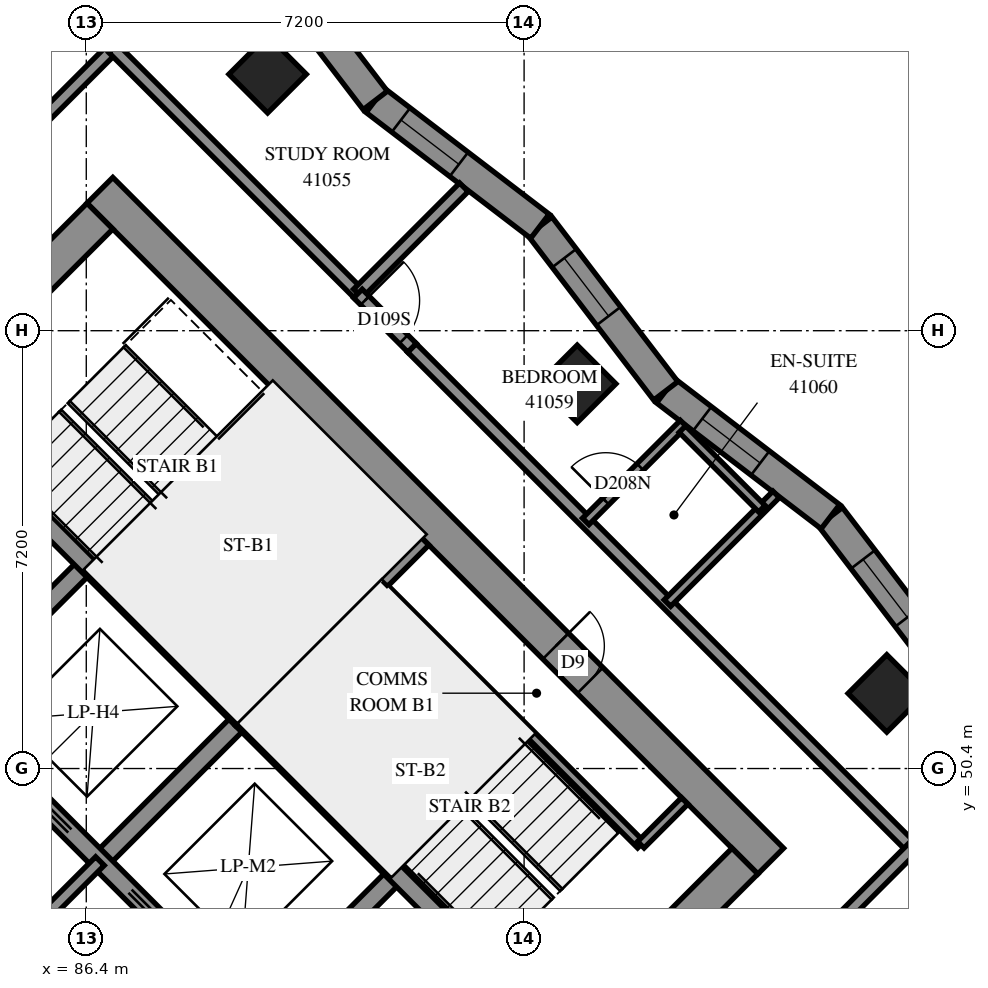
"""IFC4 building model, lengths in metres.
Left out: names, types, materials, properties, quantities, classifications, styles, units other than length and angle.
Written with IfcOpenShell. Run it as: python <this file> out.ifc"""

import sys

from ifc_helpers import new_model, si_unit, direction, frame, frame_2d, origin, origin_2d, place, context, subcontext, project, spatial, polyline, rectangle, outline, extrude, element, fill, save


model = new_model("IFC4")
c1 = context("Model", 3, precision=1e-05, world=origin(), true_north=direction((0.0, 1.0)))
c2 = subcontext(c1, "Body", "Model", "MODEL_VIEW")
j1 = project(units=[si_unit("LENGTHUNIT", "METRE"), si_unit("PLANEANGLEUNIT", "RADIAN")], contexts=[c1])
p1 = place(None, origin())
s1 = spatial("IfcSite", under=j1, at=p1, CompositionType="ELEMENT")
p2 = place(p1, origin())
s2 = spatial("IfcBuilding", under=s1, at=p2, CompositionType="ELEMENT")
p3 = place(p2, frame((0.0, 0.0, 152.4)))
s3 = spatial("IfcBuildingStorey", under=s2, at=p3, CompositionType="ELEMENT", Elevation=152.4)
for number, where, z_axis, x_axis in (
    (1, (89.382, 61.818, 0.0), (0.0, 0.0, 1.0), (0.707, -0.707, 0.0)),
    (2, (94.474, 56.727, 0.0), (0.0, 0.0, 1.0), (0.707, -0.707, 0.0)),
    (3, (99.565, 51.635, 0.0), (0.0, 0.0, 1.0), (0.707, -0.707, 0.0)),
):
    element("IfcColumn", number, at=place(p3, frame(where, z_axis=z_axis, x_axis=x_axis)), inside=s3, PredefinedType="COLUMN", context=c2, shape_type="SweptSolid", body=[
        extrude(rectangle(XDim=0.9, YDim=0.9, at=origin_2d()), origin(), (0.0, 0.0, 1.0), 3.1),
    ])
p4 = place(p3, frame((76.018, 49.302, -0.3), z_axis=(0.0, 0.0, 1.0), x_axis=(0.7071067812, -0.7071067812, 0.0)))
e4 = element("IfcWall", 4, at=p4, inside=s3, PredefinedType="SHEAR", context=c2, shape_type="SweptSolid", body=[
    extrude(rectangle(XDim=15.6, YDim=0.6, at=frame_2d((7.8, 0.0))), origin(), (0.0, 0.0, 1.0), 2.7),
])
p5 = place(p3, frame((86.625, 59.908, -0.3), z_axis=(0.0, 0.0, 1.0), x_axis=(0.7071067812, -0.7071067812, 0.0)))
e5 = element("IfcWall", 5, at=p5, inside=s3, PredefinedType="SHEAR", context=c2, shape_type="SweptSolid", body=[
    extrude(rectangle(XDim=15.6, YDim=0.6, at=frame_2d((7.8, 0.0))), origin(), (0.0, 0.0, 1.0), 2.7),
])
p6 = place(p5, frame((10.6, 0.0, 0.3)))
e6 = element("IfcOpeningElement", 6, at=p6, cuts=e5, PredefinedType="OPENING", context=c2, shape_type="SweptSolid", body=[
    extrude(rectangle(XDim=0.8, YDim=2.1, at=frame_2d((0.4, 1.05))), frame((0.0, 0.31, 0.0), z_axis=(0.0, -1.0, 0.0), x_axis=(1.0, 0.0, 0.0)), (0.0, 0.0, 1.0), 0.62),
])
p7 = place(p3, frame((76.442, 49.302, -0.3), z_axis=(0.0, 0.0, 1.0), x_axis=(0.7071067812, 0.7071067812, 0.0)))
e7 = element("IfcWall", 7, at=p7, inside=s3, PredefinedType="SHEAR", context=c2, shape_type="SweptSolid", body=[
    extrude(rectangle(XDim=14.4, YDim=0.6, at=frame_2d((7.2, 0.0))), origin(), (0.0, 0.0, 1.0), 2.7),
])
p8 = place(p7, frame((4.55, 0.0, 0.3)))
e8 = element("IfcOpeningElement", 8, at=p8, cuts=e7, PredefinedType="OPENING", context=c2, shape_type="SweptSolid", body=[
    extrude(rectangle(XDim=1.1, YDim=2.1, at=frame_2d((0.55, 1.05))), frame((0.0, 0.31, 0.0), z_axis=(0.0, -1.0, 0.0), x_axis=(1.0, 0.0, 0.0)), (0.0, 0.0, 1.0), 0.62),
])
p9 = place(p7, frame((11.35, 0.0, 0.3)))
e9 = element("IfcOpeningElement", 9, at=p9, cuts=e7, PredefinedType="OPENING", context=c2, shape_type="SweptSolid", body=[
    extrude(rectangle(XDim=1.1, YDim=2.1, at=frame_2d((0.55, 1.05))), frame((0.0, 0.31, 0.0), z_axis=(0.0, -1.0, 0.0), x_axis=(1.0, 0.0, 0.0)), (0.0, 0.0, 1.0), 0.62),
])
p10 = place(p3, frame((87.049, 38.695, -0.3), z_axis=(0.0, 0.0, 1.0), x_axis=(0.7071067812, 0.7071067812, 0.0)))
e10 = element("IfcWall", 10, at=p10, inside=s3, PredefinedType="SHEAR", context=c2, shape_type="SweptSolid", body=[
    extrude(rectangle(XDim=14.4, YDim=0.6, at=frame_2d((7.2, 0.0))), origin(), (0.0, 0.0, 1.0), 2.7),
])
p11 = place(p10, frame((4.55, 0.0, 0.3)))
e11 = element("IfcOpeningElement", 11, at=p11, cuts=e10, PredefinedType="OPENING", context=c2, shape_type="SweptSolid", body=[
    extrude(rectangle(XDim=1.1, YDim=2.1, at=frame_2d((0.55, 1.05))), frame((0.0, 0.31, 0.0), z_axis=(0.0, -1.0, 0.0), x_axis=(1.0, 0.0, 0.0)), (0.0, 0.0, 1.0), 0.62),
])
p12 = place(p10, frame((11.35, 0.0, 0.3)))
e12 = element("IfcOpeningElement", 12, at=p12, cuts=e10, PredefinedType="OPENING", context=c2, shape_type="SweptSolid", body=[
    extrude(rectangle(XDim=1.1, YDim=2.1, at=frame_2d((0.55, 1.05))), frame((0.0, 0.31, 0.0), z_axis=(0.0, -1.0, 0.0), x_axis=(1.0, 0.0, 0.0)), (0.0, 0.0, 1.0), 0.62),
])
p13 = place(p3, frame((84.079, 51.423, 0.0), z_axis=(0.0, 0.0, 1.0), x_axis=(0.7071219326, 0.7070916295, 0.0)))
e13 = element("IfcWall", 13, at=p13, inside=s3, PredefinedType="SOLIDWALL", context=c2, shape_type="SweptSolid", body=[
    extrude(rectangle(XDim=3.3, YDim=0.3, at=frame_2d((1.65, 0.0))), origin(), (0.0, 0.0, 1.0), 3.1),
])
for number, where, z_axis, x_axis in (
    (14, (86.625, 48.878, 0.0), (0.0, 0.0, 1.0), (0.707, 0.707, 0.0)),
    (15, (89.17, 46.332, 0.0), (0.0, 0.0, 1.0), (0.707, 0.707, 0.0)),
):
    element("IfcWall", number, at=place(p3, frame(where, z_axis=z_axis, x_axis=x_axis)), inside=s3, PredefinedType="SOLIDWALL", context=c2, shape_type="SweptSolid", body=[
        extrude(rectangle(XDim=3.3, YDim=0.3, at=frame_2d((1.65, 0.0))), origin(), (0.0, 0.0, 1.0), 3.1),
    ])
p14 = place(p3, frame((78.988, 51.423, 0.0), z_axis=(0.0, 0.0, 1.0), x_axis=(0.7071067812, -0.7071067812, 0.0)))
e16 = element("IfcWall", 16, at=p14, inside=s3, PredefinedType="SOLIDWALL", context=c2, shape_type="SweptSolid", body=[
    extrude(rectangle(XDim=14.4, YDim=0.3, at=frame_2d((7.2, 0.0))), origin(), (0.0, 0.0, 1.0), 3.1),
])
p15 = place(p14, frame((1.35, 0.0, 0.0)))
e17 = element("IfcOpeningElement", 17, at=p15, cuts=e16, PredefinedType="OPENING", context=c2, shape_type="SweptSolid", body=[
    extrude(rectangle(XDim=0.9, YDim=2.1, at=frame_2d((0.45, 1.05))), frame((0.0, 0.16, 0.0), z_axis=(0.0, -1.0, 0.0), x_axis=(1.0, 0.0, 0.0)), (0.0, 0.0, 1.0), 0.32),
])
p16 = place(p14, frame((4.95, 0.0, 0.0)))
e18 = element("IfcOpeningElement", 18, at=p16, cuts=e16, PredefinedType="OPENING", context=c2, shape_type="SweptSolid", body=[
    extrude(rectangle(XDim=0.9, YDim=2.1, at=frame_2d((0.45, 1.05))), frame((0.0, 0.16, 0.0), z_axis=(0.0, -1.0, 0.0), x_axis=(1.0, 0.0, 0.0)), (0.0, 0.0, 1.0), 0.32),
])
p17 = place(p14, frame((8.55, 0.0, 0.0)))
e19 = element("IfcOpeningElement", 19, at=p17, cuts=e16, PredefinedType="OPENING", context=c2, shape_type="SweptSolid", body=[
    extrude(rectangle(XDim=0.9, YDim=2.1, at=frame_2d((0.45, 1.05))), frame((0.0, 0.16, 0.0), z_axis=(0.0, -1.0, 0.0), x_axis=(1.0, 0.0, 0.0)), (0.0, 0.0, 1.0), 0.32),
])
p18 = place(p14, frame((12.05, 0.0, 0.0)))
e20 = element("IfcOpeningElement", 20, at=p18, cuts=e16, PredefinedType="OPENING", context=c2, shape_type="SweptSolid", body=[
    extrude(rectangle(XDim=1.1, YDim=2.1, at=frame_2d((0.55, 1.05))), frame((0.0, 0.16, 0.0), z_axis=(0.0, -1.0, 0.0), x_axis=(1.0, 0.0, 0.0)), (0.0, 0.0, 1.0), 0.32),
])
p19 = place(p3, frame((81.534, 53.969, 0.0), z_axis=(0.0, 0.0, 1.0), x_axis=(0.707103309, -0.7071102534, 0.0)))
e21 = element("IfcWall", 21, at=p19, inside=s3, PredefinedType="SOLIDWALL", context=c2, shape_type="SweptSolid", body=[
    extrude(rectangle(XDim=14.4, YDim=0.3, at=frame_2d((7.2, 0.0))), origin(), (0.0, 0.0, 1.0), 3.1),
])
p20 = place(p19, frame((1.25, 0.0, 0.0)))
e22 = element("IfcOpeningElement", 22, at=p20, cuts=e21, PredefinedType="OPENING", context=c2, shape_type="SweptSolid", body=[
    extrude(rectangle(XDim=1.1, YDim=2.1, at=frame_2d((0.55, 1.05))), frame((0.0, 0.16, 0.0), z_axis=(0.0, -1.0, 0.0), x_axis=(1.0, 0.0, 0.0)), (0.0, 0.0, 1.0), 0.32),
])
p21 = place(p19, frame((4.85, 0.0, 0.0)))
e23 = element("IfcOpeningElement", 23, at=p21, cuts=e21, PredefinedType="OPENING", context=c2, shape_type="SweptSolid", body=[
    extrude(rectangle(XDim=1.1, YDim=2.1, at=frame_2d((0.55, 1.05))), frame((0.0, 0.16, 0.0), z_axis=(0.0, -1.0, 0.0), x_axis=(1.0, 0.0, 0.0)), (0.0, 0.0, 1.0), 0.32),
])
p22 = place(p19, frame((8.45, 0.0, 0.0)))
e24 = element("IfcOpeningElement", 24, at=p22, cuts=e21, PredefinedType="OPENING", context=c2, shape_type="SweptSolid", body=[
    extrude(rectangle(XDim=1.1, YDim=2.1, at=frame_2d((0.55, 1.05))), frame((0.0, 0.16, 0.0), z_axis=(0.0, -1.0, 0.0), x_axis=(1.0, 0.0, 0.0)), (0.0, 0.0, 1.0), 0.32),
])
p23 = place(p19, frame((12.05, 0.0, 0.0)))
e25 = element("IfcOpeningElement", 25, at=p23, cuts=e21, PredefinedType="OPENING", context=c2, shape_type="SweptSolid", body=[
    extrude(rectangle(XDim=1.1, YDim=2.1, at=frame_2d((0.55, 1.05))), frame((0.0, 0.16, 0.0), z_axis=(0.0, -1.0, 0.0), x_axis=(1.0, 0.0, 0.0)), (0.0, 0.0, 1.0), 0.32),
])
for number, where, z_axis, x_axis in (
    (26, (83.867, 56.302, 0.0), (0.0, 0.0, 1.0), (0.707, -0.707, 0.0)),
    (27, (88.958, 51.211, 0.0), (0.0, 0.0, 1.0), (0.707, -0.707, 0.0)),
):
    element("IfcWall", number, at=place(p3, frame(where, z_axis=z_axis, x_axis=x_axis)), inside=s3, PredefinedType="SOLIDWALL", context=c2, shape_type="SweptSolid", body=[
        extrude(rectangle(XDim=7.2, YDim=0.3, at=frame_2d((3.6, 0.0))), origin(), (0.0, 0.0, 1.0), 3.1),
    ])
p24 = place(p3, frame((88.958, 51.211, 0.0), z_axis=(0.0, 0.0, 1.0), x_axis=(0.7071067812, 0.7071067812, 0.0)))
e28 = element("IfcWall", 28, at=p24, inside=s3, PredefinedType="SOLIDWALL", context=c2, shape_type="SweptSolid", body=[
    extrude(rectangle(XDim=4.2, YDim=0.3, at=frame_2d((2.1, 0.0))), origin(), (0.0, 0.0, 1.0), 3.1),
])
p25 = place(p3, frame((100.707, 51.834, 0.0), z_axis=(0.0, 0.0, 1.0), x_axis=(-0.6073041389, 0.7944694348, 0.0)))
e29 = element("IfcWall", 29, at=p25, inside=s3, PredefinedType="SOLIDWALL", context=c2, shape_type="SweptSolid", body=[
    extrude(outline(polyline([(0.033, -0.25), (3.441, -0.25), (3.374, 0.25), (-0.033, 0.25), (0.033, -0.25)])), origin(), (0.0, 0.0, 1.0), 3.1),
])
p26 = place(p25, frame((1.324, 0.0, 0.45)))
e30 = element("IfcOpeningElement", 30, at=p26, cuts=e29, PredefinedType="OPENING", context=c2, shape_type="SweptSolid", body=[
    extrude(rectangle(XDim=1.2, YDim=2.5, at=frame_2d((0.6, 1.25))), frame((0.0, 0.26, 0.0), z_axis=(0.0, -1.0, 0.0), x_axis=(1.0, 0.0, 0.0)), (0.0, 0.0, 1.0), 0.52),
])
p27 = place(p3, frame((98.637, 54.541, 0.0), z_axis=(0.0, 0.0, 1.0), x_axis=(-0.7944694348, 0.6073041389, 0.0)))
e31 = element("IfcWall", 31, at=p27, inside=s3, PredefinedType="SOLIDWALL", context=c2, shape_type="SweptSolid", body=[
    extrude(outline(polyline([(-0.033, -0.25), (3.374, -0.25), (3.441, 0.25), (0.033, 0.25), (-0.033, -0.25)])), origin(), (0.0, 0.0, 1.0), 3.1),
])
p28 = place(p27, frame((1.452, 0.0, 0.45)))
e32 = element("IfcOpeningElement", 32, at=p28, cuts=e31, PredefinedType="OPENING", context=c2, shape_type="SweptSolid", body=[
    extrude(rectangle(XDim=1.2, YDim=2.5, at=frame_2d((0.6, 1.25))), frame((0.0, 0.26, 0.0), z_axis=(0.0, -1.0, 0.0), x_axis=(1.0, 0.0, 0.0)), (0.0, 0.0, 1.0), 0.52),
])
p29 = place(p3, frame((95.93, 56.611, 0.0), z_axis=(0.0, 0.0, 1.0), x_axis=(-0.6073041389, 0.7944694348, 0.0)))
e33 = element("IfcWall", 33, at=p29, inside=s3, PredefinedType="SOLIDWALL", context=c2, shape_type="SweptSolid", body=[
    extrude(outline(polyline([(0.033, -0.25), (3.441, -0.25), (3.374, 0.25), (-0.033, 0.25), (0.033, -0.25)])), origin(), (0.0, 0.0, 1.0), 3.1),
])
p30 = place(p29, frame((1.548, 0.0, 0.45)))
e34 = element("IfcOpeningElement", 34, at=p30, cuts=e33, PredefinedType="OPENING", context=c2, shape_type="SweptSolid", body=[
    extrude(rectangle(XDim=1.2, YDim=2.5, at=frame_2d((0.6, 1.25))), frame((0.0, 0.26, 0.0), z_axis=(0.0, -1.0, 0.0), x_axis=(1.0, 0.0, 0.0)), (0.0, 0.0, 1.0), 0.52),
])
p31 = place(p3, frame((93.86, 59.318, 0.0), z_axis=(0.0, 0.0, 1.0), x_axis=(-0.7944694348, 0.6073041389, 0.0)))
e35 = element("IfcWall", 35, at=p31, inside=s3, PredefinedType="SOLIDWALL", context=c2, shape_type="SweptSolid", body=[
    extrude(outline(polyline([(-0.033, -0.25), (3.374, -0.25), (3.441, 0.25), (0.033, 0.25), (-0.033, -0.25)])), origin(), (0.0, 0.0, 1.0), 3.1),
])
p32 = place(p31, frame((1.677, 0.0, 0.45)))
e36 = element("IfcOpeningElement", 36, at=p32, cuts=e35, PredefinedType="OPENING", context=c2, shape_type="SweptSolid", body=[
    extrude(rectangle(XDim=1.2, YDim=2.5, at=frame_2d((0.6, 1.25))), frame((0.0, 0.26, 0.0), z_axis=(0.0, -1.0, 0.0), x_axis=(1.0, 0.0, 0.0)), (0.0, 0.0, 1.0), 0.52),
])
p33 = place(p3, frame((91.153, 61.388, 0.0), z_axis=(0.0, 0.0, 1.0), x_axis=(-0.6073041389, 0.7944694348, 0.0)))
e37 = element("IfcWall", 37, at=p33, inside=s3, PredefinedType="SOLIDWALL", context=c2, shape_type="SweptSolid", body=[
    extrude(outline(polyline([(0.033, -0.25), (3.441, -0.25), (3.374, 0.25), (-0.033, 0.25), (0.033, -0.25)])), origin(), (0.0, 0.0, 1.0), 3.1),
])
p34 = place(p33, frame((1.772, 0.0, 0.45)))
e38 = element("IfcOpeningElement", 38, at=p34, cuts=e37, PredefinedType="OPENING", context=c2, shape_type="SweptSolid", body=[
    extrude(rectangle(XDim=1.2, YDim=2.5, at=frame_2d((0.6, 1.25))), frame((0.0, 0.26, 0.0), z_axis=(0.0, -1.0, 0.0), x_axis=(1.0, 0.0, 0.0)), (0.0, 0.0, 1.0), 0.52),
])
p35 = place(p3, frame((91.313, 53.354, 0.0), z_axis=(0.0, 0.0, 1.0), x_axis=(0.7071067812, -0.7071067812, 0.0)))
e39 = element("IfcWall", 39, at=p35, inside=s3, PredefinedType="PARTITIONING", context=c2, shape_type="SweptSolid", body=[
    extrude(rectangle(XDim=5.95, YDim=0.15, at=frame_2d((2.975, 0.0))), origin(), (0.0, 0.0, 1.0), 3.1),
])
p36 = place(p3, frame((95.52, 49.146, 0.0), z_axis=(0.0, 0.0, 1.0), x_axis=(0.7071067812, 0.7071067812, 0.0)))
e40 = element("IfcWall", 40, at=p36, inside=s3, PredefinedType="PARTITIONING", context=c2, shape_type="SweptSolid", body=[
    extrude(rectangle(XDim=1.02, YDim=0.15, at=frame_2d((0.51, 0.0))), origin(), (0.0, 0.0, 1.0), 3.1),
])
p37 = place(p3, frame((84.079, 46.332, 0.0), z_axis=(0.0, 0.0, 1.0), x_axis=(0.7071067812, 0.7071067812, 0.0)))
e41 = element("IfcWall", 41, at=p37, inside=s3, PredefinedType="PARTITIONING", context=c2, shape_type="SweptSolid", body=[
    extrude(rectangle(XDim=3.6, YDim=0.2, at=frame_2d((1.8, 0.0))), origin(), (0.0, 0.0, 1.0), 3.1),
])
p38 = place(p3, frame((91.755, 57.317, 0.0), z_axis=(0.0, 0.0, 1.0), x_axis=(0.7071067812, -0.7071067812, 0.0)))
e42 = element("IfcWall", 42, at=p38, inside=s3, PredefinedType="PARTITIONING", context=c2, shape_type="SweptSolid", body=[
    extrude(rectangle(XDim=11.639, YDim=0.2, at=frame_2d((5.819, 0.0))), origin(), (0.0, 0.0, 1.0), 3.1),
])
p39 = place(p3, frame((95.25, 42.232, 0.0), z_axis=(0.0, 0.0, 1.0), x_axis=(0.7071114163, 0.707102146, 0.0)))
e43 = element("IfcWall", 43, at=p39, inside=s3, PredefinedType="PARTITIONING", context=c2, shape_type="SweptSolid", body=[
    extrude(rectangle(XDim=10.787, YDim=0.2, at=frame_2d((5.394, 0.0))), origin(), (0.0, 0.0, 1.0), 3.1),
])
p40 = place(p3, frame((80.899, 58.427, 0.0), z_axis=(0.0, 0.0, 1.0), x_axis=(0.7071121545, 0.7071014078, 0.0)))
e44 = element("IfcWall", 44, at=p40, inside=s3, PredefinedType="PARTITIONING", context=c2, shape_type="SweptSolid", body=[
    extrude(rectangle(XDim=9.305, YDim=0.2, at=frame_2d((4.653, 0.0))), origin(), (0.0, 0.0, 1.0), 3.1),
])
p41 = place(p3, frame((94.19, 43.292, 0.0), z_axis=(0.0, 0.0, 1.0), x_axis=(0.7071067812, 0.7071067812, 0.0)))
e45 = element("IfcWall", 45, at=p41, inside=s3, PredefinedType="PARTITIONING", context=c2, shape_type="SweptSolid", body=[
    extrude(rectangle(XDim=8.2, YDim=0.2, at=frame_2d((4.1, 0.0))), origin(), (0.0, 0.0, 1.0), 3.1),
])
p42 = place(p41, frame((0.251, 0.0, 0.0)))
e46 = element("IfcOpeningElement", 46, at=p42, cuts=e45, PredefinedType="OPENING", context=c2, shape_type="SweptSolid", body=[
    extrude(rectangle(XDim=1.0, YDim=2.1, at=frame_2d((0.5, 1.05))), frame((0.0, 0.11, 0.0), z_axis=(0.0, -1.0, 0.0), x_axis=(1.0, 0.0, 0.0)), (0.0, 0.0, 1.0), 0.22),
])
p43 = place(p3, frame((81.038, 56.444, 0.0), z_axis=(0.0, 0.0, 1.0), x_axis=(0.7071067812, 0.7071067812, 0.0)))
e47 = element("IfcWall", 47, at=p43, inside=s3, PredefinedType="PARTITIONING", context=c2, shape_type="SweptSolid", body=[
    extrude(rectangle(XDim=8.2, YDim=0.2, at=frame_2d((4.1, 0.0))), origin(), (0.0, 0.0, 1.0), 3.1),
])
p44 = place(p43, frame((0.66, 0.0, 0.0)))
e48 = element("IfcOpeningElement", 48, at=p44, cuts=e47, PredefinedType="OPENING", context=c2, shape_type="SweptSolid", body=[
    extrude(rectangle(XDim=1.0, YDim=2.1, at=frame_2d((0.5, 1.05))), frame((0.0, 0.11, 0.0), z_axis=(0.0, -1.0, 0.0), x_axis=(1.0, 0.0, 0.0)), (0.0, 0.0, 1.0), 0.22),
])
p45 = place(p3, frame((86.841, 62.245, 0.0), z_axis=(0.0, 0.0, 1.0), x_axis=(0.7071067812, -0.7071067812, 0.0)))
e49 = element("IfcWall", 49, at=p45, inside=s3, PredefinedType="PARTITIONING", context=c2, shape_type="SweptSolid", body=[
    extrude(rectangle(XDim=5.699, YDim=0.2, at=frame_2d((2.85, 0.0))), origin(), (0.0, 0.0, 1.0), 3.1),
])
p46 = place(p3, frame((95.957, 53.121, 0.0), z_axis=(0.0, 0.0, 1.0), x_axis=(0.7071067812, 0.7071067812, 0.0)))
e50 = element("IfcWall", 50, at=p46, inside=s3, PredefinedType="PARTITIONING", context=c2, shape_type="SweptSolid", body=[
    extrude(rectangle(XDim=2.528, YDim=0.15, at=frame_2d((1.264, 0.0))), origin(), (0.0, 0.0, 1.0), 3.1),
])
p47 = place(p3, frame((90.867, 58.213, 0.0), z_axis=(0.0, 0.0, 1.0), x_axis=(0.7066202121, 0.7075930157, 0.0)))
e51 = element("IfcWall", 51, at=p47, inside=s3, PredefinedType="PARTITIONING", context=c2, shape_type="SweptSolid", body=[
    extrude(rectangle(XDim=2.467, YDim=0.2, at=frame_2d((1.234, 0.0))), origin(), (0.0, 0.0, 1.0), 3.1),
])
p48 = place(p3, frame((94.614, 54.464, 0.0), z_axis=(0.0, 0.0, 1.0), x_axis=(0.7071067812, 0.7071067812, 0.0)))
e52 = element("IfcWall", 52, at=p48, inside=s3, PredefinedType="PARTITIONING", context=c2, shape_type="SweptSolid", body=[
    extrude(rectangle(XDim=2.275, YDim=0.15, at=frame_2d((1.137, 0.0))), origin(), (0.0, 0.0, 1.0), 3.1),
])
p49 = place(p48, frame((0.466, 0.0, 0.0)))
e53 = element("IfcOpeningElement", 53, at=p49, cuts=e52, PredefinedType="OPENING", context=c2, shape_type="SweptSolid", body=[
    extrude(rectangle(XDim=0.8, YDim=2.1, at=frame_2d((0.4, 1.05))), frame((0.0, 0.085, 0.0), z_axis=(0.0, -1.0, 0.0), x_axis=(1.0, 0.0, 0.0)), (0.0, 0.0, 1.0), 0.17),
])
p50 = place(p3, frame((96.203, 55.981, 0.0), z_axis=(0.0, 0.0, 1.0), x_axis=(0.7071067812, -0.7071067812, 0.0)))
e54 = element("IfcWall", 54, at=p50, inside=s3, PredefinedType="PARTITIONING", context=c2, shape_type="SweptSolid", body=[
    extrude(rectangle(XDim=1.85, YDim=0.15, at=frame_2d((0.925, 0.0))), origin(), (0.0, 0.0, 1.0), 3.1),
])
p51 = place(p3, frame((90.867, 58.211, 0.0), z_axis=(0.0, 0.0, 1.0), x_axis=(0.706312726, -0.7078999456, 0.0)))
e55 = element("IfcWall", 55, at=p51, inside=s3, PredefinedType="PARTITIONING", context=c2, shape_type="SweptSolid", body=[
    extrude(rectangle(XDim=1.26, YDim=0.2, at=frame_2d((0.63, 0.0))), origin(), (0.0, 0.0, 1.0), 3.1),
])
p52 = place(p51, frame((0.162, 0.0, 0.0)))
e56 = element("IfcOpeningElement", 56, at=p52, cuts=e55, PredefinedType="OPENING", context=c2, shape_type="SweptSolid", body=[
    extrude(rectangle(XDim=0.9, YDim=2.1, at=frame_2d((0.45, 1.05))), frame((0.0, 0.11, 0.0), z_axis=(0.0, -1.0, 0.0), x_axis=(1.0, 0.0, 0.0)), (0.0, 0.0, 1.0), 0.22),
])
p53 = place(p26, origin())
e57 = element("IfcWindow", 57, at=p53, inside=s3, PartitioningType="SINGLE_PANEL", PredefinedType="WINDOW", context=c2, shape_type="SweptSolid", body=[
    extrude(rectangle(XDim=1.2, YDim=2.5, at=frame_2d((0.6, 1.25))), frame((0.0, 0.18, 0.0), z_axis=(0.0, -1.0, 0.0), x_axis=(1.0, 0.0, 0.0)), (0.0, 0.0, 1.0), 0.06),
])
fill(e30, e57)
p54 = place(p28, origin())
e58 = element("IfcWindow", 58, at=p54, inside=s3, PartitioningType="SINGLE_PANEL", PredefinedType="WINDOW", context=c2, shape_type="SweptSolid", body=[
    extrude(rectangle(XDim=1.2, YDim=2.5, at=frame_2d((0.6, 1.25))), frame((0.0, 0.18, 0.0), z_axis=(0.0, -1.0, 0.0), x_axis=(1.0, 0.0, 0.0)), (0.0, 0.0, 1.0), 0.06),
])
fill(e32, e58)
p55 = place(p30, origin())
e59 = element("IfcWindow", 59, at=p55, inside=s3, PartitioningType="SINGLE_PANEL", PredefinedType="WINDOW", context=c2, shape_type="SweptSolid", body=[
    extrude(rectangle(XDim=1.2, YDim=2.5, at=frame_2d((0.6, 1.25))), frame((0.0, 0.18, 0.0), z_axis=(0.0, -1.0, 0.0), x_axis=(1.0, 0.0, 0.0)), (0.0, 0.0, 1.0), 0.06),
])
fill(e34, e59)
p56 = place(p32, origin())
e60 = element("IfcWindow", 60, at=p56, inside=s3, PartitioningType="SINGLE_PANEL", PredefinedType="WINDOW", context=c2, shape_type="SweptSolid", body=[
    extrude(rectangle(XDim=1.2, YDim=2.5, at=frame_2d((0.6, 1.25))), frame((0.0, 0.18, 0.0), z_axis=(0.0, -1.0, 0.0), x_axis=(1.0, 0.0, 0.0)), (0.0, 0.0, 1.0), 0.06),
])
fill(e36, e60)
p57 = place(p6, origin())
e61 = element("IfcDoor", 61, at=p57, inside=s3, OperationType="SINGLE_SWING_RIGHT", PredefinedType="DOOR", context=c2, shape_type="SweptSolid", body=[
    extrude(rectangle(XDim=0.8, YDim=2.1, at=frame_2d((0.4, 1.05))), frame((0.0, 0.025, 0.0), z_axis=(0.0, -1.0, 0.0), x_axis=(1.0, 0.0, 0.0)), (0.0, 0.0, 1.0), 0.05),
])
fill(e6, e61)
p58 = place(p52, origin())
e62 = element("IfcDoor", 62, at=p58, inside=s3, OperationType="SINGLE_SWING_RIGHT", PredefinedType="DOOR", context=c2, shape_type="SweptSolid", body=[
    extrude(rectangle(XDim=0.9, YDim=2.1, at=frame_2d((0.45, 1.05))), frame((0.0, 0.025, 0.0), z_axis=(0.0, -1.0, 0.0), x_axis=(1.0, 0.0, 0.0)), (0.0, 0.0, 1.0), 0.05),
])
fill(e56, e62)
p59 = place(p49, origin())
e63 = element("IfcDoor", 63, at=p59, inside=s3, OperationType="SINGLE_SWING_RIGHT", PredefinedType="DOOR", context=c2, shape_type="SweptSolid", body=[
    extrude(rectangle(XDim=0.8, YDim=2.1, at=frame_2d((0.4, 1.05))), frame((0.0, 0.025, 0.0), z_axis=(0.0, -1.0, 0.0), x_axis=(1.0, 0.0, 0.0)), (0.0, 0.0, 1.0), 0.05),
])
fill(e53, e63)
save(model, sys.argv[1])
